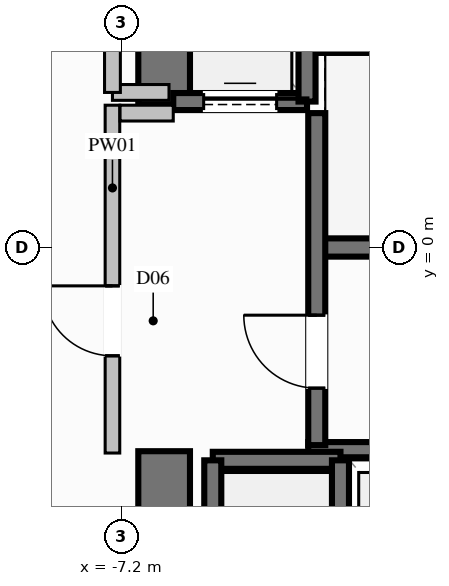
"""IFC4 building model, lengths in metres.
Left out: names, types, materials, properties, quantities, classifications, styles, units other than length and angle.
Written with IfcOpenShell. Run it as: python <this file> out.ifc"""

import sys

from ifc_helpers import new_model, si_unit, direction, frame, frame_2d, origin, place, context, subcontext, project, spatial, rectangle, extrude, element, fill, save


model = new_model("IFC4")
c1 = context("Model", 3, precision=1e-05, world=origin(), true_north=direction((0.0, 1.0)))
c2 = subcontext(c1, "Body", "Model", "MODEL_VIEW")
j1 = project(units=[si_unit("LENGTHUNIT", "METRE"), si_unit("PLANEANGLEUNIT", "RADIAN")], contexts=[c1])
p1 = place(None, origin())
s1 = spatial("IfcSite", under=j1, at=p1, CompositionType="ELEMENT")
p2 = place(p1, origin())
s2 = spatial("IfcBuilding", under=s1, at=p2, CompositionType="ELEMENT")
p3 = place(p2, frame((0.0, 0.0, 18.6)))
s3 = spatial("IfcBuildingStorey", under=s2, at=p3, CompositionType="ELEMENT", Elevation=18.6)
p4 = place(p3, frame((-3.99, 0.0, 0.0), z_axis=(0.0, 0.0, 1.0), x_axis=(1.0, 0.0, 0.0)))
e1 = element("IfcWall", 1, at=p4, inside=s3, PredefinedType="SHEAR", context=c2, shape_type="SweptSolid", body=[
    extrude(rectangle(XDim=7.98, YDim=0.3, at=frame_2d((3.99, 0.0))), origin(), (0.0, 0.0, 1.0), 5.0),
])
for number, where, z_axis, x_axis in (
    (2, (-4.13, -3.325, 0.0), (0.0, 0.0, 1.0), (1.0, 0.0, 0.0)),
    (3, (-4.13, 3.325, 0.0), (0.0, 0.0, 1.0), (1.0, 0.0, 0.0)),
):
    element("IfcWall", number, at=place(p3, frame(where, z_axis=z_axis, x_axis=x_axis)), inside=s3, PredefinedType="SOLIDWALL", context=c2, shape_type="SweptSolid", body=[
        extrude(rectangle(XDim=8.26, YDim=0.25, at=frame_2d((4.13, 0.0))), origin(), (0.0, 0.0, 1.0), 5.0),
    ])
p5 = place(p3, frame((-6.5, 2.35, 0.0), z_axis=(0.0, 0.0, 1.0), x_axis=(0.0, 1.0, 0.0)))
e4 = element("IfcWall", 4, at=p5, inside=s3, PredefinedType="SHEAR", context=c2, shape_type="SweptSolid", body=[
    extrude(rectangle(XDim=4.175, YDim=0.85, at=frame_2d((2.087, 0.0))), origin(), (0.0, 0.0, 1.0), 5.0),
])
p6 = place(p3, frame((-6.5, -6.525, 0.0), z_axis=(0.0, 0.0, 1.0), x_axis=(0.0, 1.0, 0.0)))
e5 = element("IfcWall", 5, at=p6, inside=s3, PredefinedType="SHEAR", context=c2, shape_type="SweptSolid", body=[
    extrude(rectangle(XDim=3.175, YDim=0.85, at=frame_2d((1.587, 0.0))), origin(), (0.0, 0.0, 1.0), 5.0),
])
p7 = place(p3, frame((-3.6, -3.5, 0.0), z_axis=(0.0, 0.0, 1.0), x_axis=(-1.0, 0.0, 0.0)))
e6 = element("IfcWall", 6, at=p7, inside=s3, PredefinedType="SOLIDWALL", context=c2, shape_type="SweptSolid", body=[
    extrude(rectangle(XDim=2.1, YDim=0.28, at=frame_2d((1.05, 0.0))), origin(), (0.0, 0.0, 1.0), 4.64),
])
for number, where, z_axis, x_axis in (
    (7, (-5.7, -3.5, 0.0), (0.0, 0.0, 1.0), (0.0, -1.0, 0.0)),
    (8, (-3.6, -6.0, 0.0), (0.0, 0.0, 1.0), (0.0, 1.0, 0.0)),
):
    element("IfcWall", number, at=place(p3, frame(where, z_axis=z_axis, x_axis=x_axis)), inside=s3, PredefinedType="SOLIDWALL", context=c2, shape_type="SweptSolid", body=[
        extrude(rectangle(XDim=2.5, YDim=0.28, at=frame_2d((1.25, 0.0))), origin(), (0.0, 0.0, 1.0), 4.64),
    ])
p8 = place(p3, frame((-6.35, 2.4, 0.0), z_axis=(0.0, 0.0, 1.0), x_axis=(1.0, 0.0, 0.0)))
e9 = element("IfcWall", 9, at=p8, inside=s3, PredefinedType="SOLIDWALL", context=c2, shape_type="SweptSolid", body=[
    extrude(rectangle(XDim=2.2, YDim=0.28, at=frame_2d((1.1, 0.0))), origin(), (0.0, 0.0, 1.0), 4.64),
])
p9 = place(p8, frame((0.5, 0.0, 0.0)))
e10 = element("IfcOpeningElement", 10, at=p9, cuts=e9, PredefinedType="OPENING", context=c2, shape_type="SweptSolid", body=[
    extrude(rectangle(XDim=1.2, YDim=2.2, at=frame_2d((0.6, 1.1))), frame((0.0, 0.15, 0.0), z_axis=(0.0, -1.0, 0.0), x_axis=(1.0, 0.0, 0.0)), (0.0, 0.0, 1.0), 0.3),
])
p10 = place(p3, frame((-4.15, 2.4, 0.0), z_axis=(0.0, 0.0, 1.0), x_axis=(0.0, 1.0, 0.0)))
e11 = element("IfcWall", 11, at=p10, inside=s3, PredefinedType="SOLIDWALL", context=c2, shape_type="SweptSolid", body=[
    extrude(rectangle(XDim=2.7, YDim=0.28, at=frame_2d((1.35, 0.0))), origin(), (0.0, 0.0, 1.0), 4.64),
])
p11 = place(p3, frame((-3.99, -3.25, 0.0), z_axis=(0.0, 0.0, 1.0), x_axis=(0.0, 1.0, 0.0)))
e12 = element("IfcWall", 12, at=p11, inside=s3, PredefinedType="SOLIDWALL", context=c2, shape_type="SweptSolid", body=[
    extrude(rectangle(XDim=5.46, YDim=0.28, at=frame_2d((2.73, 0.0))), origin(), (0.0, 0.0, 1.0), 4.64),
])
p12 = place(p11, frame((0.937, 0.0, 0.0)))
e13 = element("IfcOpeningElement", 13, at=p12, cuts=e12, PredefinedType="OPENING", context=c2, shape_type="SweptSolid", body=[
    extrude(rectangle(XDim=1.2, YDim=2.2, at=frame_2d((0.6, 1.1))), frame((0.0, 0.15, 0.0), z_axis=(0.0, -1.0, 0.0), x_axis=(1.0, 0.0, 0.0)), (0.0, 0.0, 1.0), 0.3),
])
p13 = place(p3, frame((-7.35, -3.38, 0.0), z_axis=(0.0, 0.0, 1.0), x_axis=(0.0, 1.0, 0.0)))
e14 = element("IfcWall", 14, at=p13, inside=s3, PredefinedType="PARTITIONING", context=c2, shape_type="SweptSolid", body=[
    extrude(rectangle(XDim=5.72, YDim=0.24, at=frame_2d((2.86, 0.0))), origin(), (0.0, 0.0, 1.0), 3.525),
])
p14 = place(p13, frame((1.599, 0.0, 0.0)))
e15 = element("IfcOpeningElement", 15, at=p14, cuts=e14, PredefinedType="OPENING", context=c2, shape_type="SweptSolid", body=[
    extrude(rectangle(XDim=1.15, YDim=2.2, at=frame_2d((0.575, 1.1))), frame((0.0, 0.13, 0.0), z_axis=(0.0, -1.0, 0.0), x_axis=(1.0, 0.0, 0.0)), (0.0, 0.0, 1.0), 0.26),
])
p15 = place(p3, frame((-7.225, 2.21, 0.0), z_axis=(0.0, 0.0, 1.0), x_axis=(1.0, 0.0, 0.0)))
e16 = element("IfcWall", 16, at=p15, inside=s3, PredefinedType="PARTITIONING", context=c2, shape_type="SweptSolid", body=[
    extrude(rectangle(XDim=0.875, YDim=0.26, at=frame_2d((0.438, 0.0))), origin(), (0.0, 0.0, 1.0), 4.64),
])
p16 = place(p3, frame((-7.35, 2.55, 0.0), z_axis=(0.0, 0.0, 1.0), x_axis=(1.0, 0.0, 0.0)))
e17 = element("IfcWall", 17, at=p16, inside=s3, PredefinedType="PARTITIONING", context=c2, shape_type="SweptSolid", body=[
    extrude(rectangle(XDim=0.93, YDim=0.26, at=frame_2d((0.465, 0.0))), origin(), (0.0, 0.0, 1.0), 4.64),
])
p17 = place(p3, frame((-7.35, 2.55, 0.0), z_axis=(0.0, 0.0, 1.0), x_axis=(0.0, 1.0, 0.0)))
e18 = element("IfcWall", 18, at=p17, inside=s3, PredefinedType="PARTITIONING", context=c2, shape_type="SweptSolid", body=[
    extrude(rectangle(XDim=2.4, YDim=0.26, at=frame_2d((1.2, 0.0))), origin(), (0.0, 0.0, 1.0), 3.525),
])
p18 = place(p17, frame((0.775, 0.0, 0.0)))
e19 = element("IfcOpeningElement", 19, at=p18, cuts=e18, PredefinedType="OPENING", context=c2, shape_type="SweptSolid", body=[
    extrude(rectangle(XDim=0.85, YDim=2.05, at=frame_2d((0.425, 1.025))), frame((0.0, 0.14, 0.0), z_axis=(0.0, -1.0, 0.0), x_axis=(1.0, 0.0, 0.0)), (0.0, 0.0, 1.0), 0.28),
])
p19 = place(p9, origin())
e20 = element("IfcDoor", 20, at=p19, inside=s3, OperationType="SLIDING_TO_LEFT", PredefinedType="DOOR", context=c2, shape_type="SweptSolid", body=[
    extrude(rectangle(XDim=1.2, YDim=2.2, at=frame_2d((0.6, 1.1))), frame((0.0, 0.025, 0.0), z_axis=(0.0, -1.0, 0.0), x_axis=(1.0, 0.0, 0.0)), (0.0, 0.0, 1.0), 0.05),
])
fill(e10, e20)
p20 = place(p12, origin())
e21 = element("IfcDoor", 21, at=p20, inside=s3, OperationType="SINGLE_SWING_RIGHT", PredefinedType="DOOR", context=c2, shape_type="SweptSolid", body=[
    extrude(rectangle(XDim=1.2, YDim=2.2, at=frame_2d((0.6, 1.1))), frame((0.0, 0.025, 0.0), z_axis=(0.0, -1.0, 0.0), x_axis=(1.0, 0.0, 0.0)), (0.0, 0.0, 1.0), 0.05),
])
fill(e13, e21)
p21 = place(p14, origin())
e22 = element("IfcDoor", 22, at=p21, inside=s3, OperationType="SINGLE_SWING_RIGHT", PredefinedType="DOOR", context=c2, shape_type="SweptSolid", body=[
    extrude(rectangle(XDim=1.15, YDim=2.2, at=frame_2d((0.575, 1.1))), frame((0.0, 0.025, 0.0), z_axis=(0.0, -1.0, 0.0), x_axis=(1.0, 0.0, 0.0)), (0.0, 0.0, 1.0), 0.05),
])
fill(e15, e22)
save(model, sys.argv[1])
